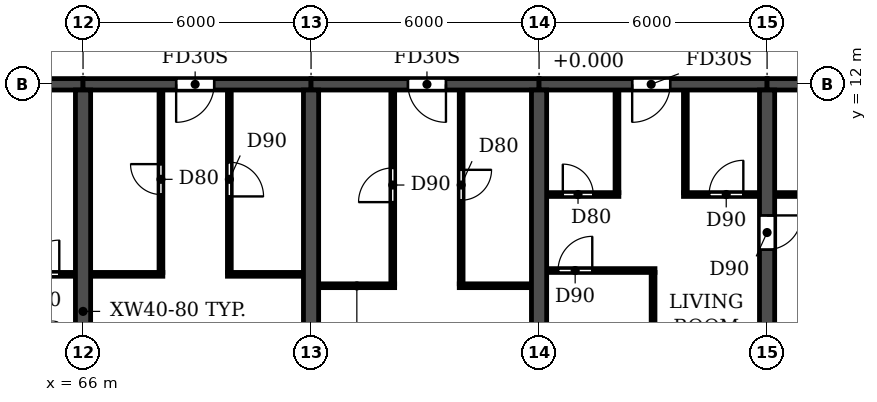
"""IFC4 building model, lengths in metres.
Left out: names, types, materials, properties, quantities, classifications, styles, units other than length and angle.
Written with IfcOpenShell. Run it as: python <this file> out.ifc"""

import sys

from ifc_helpers import new_model, si_unit, direction, frame, frame_2d, origin, place, context, subcontext, project, spatial, rectangle, extrude, element, fill, save


model = new_model("IFC4")
c1 = context("Model", 3, precision=1e-05, world=origin(), true_north=direction((0.0, 1.0)))
c2 = subcontext(c1, "Body", "Model", "MODEL_VIEW")
j1 = project(units=[si_unit("LENGTHUNIT", "METRE"), si_unit("PLANEANGLEUNIT", "RADIAN")], contexts=[c1])
p1 = place(None, origin())
s1 = spatial("IfcSite", under=j1, at=p1, CompositionType="ELEMENT")
p2 = place(p1, origin())
s2 = spatial("IfcBuilding", under=s1, at=p2, CompositionType="ELEMENT")
p3 = place(p2, frame((0.0, 0.0, 26.7)))
s3 = spatial("IfcBuildingStorey", under=s2, at=p3, CompositionType="ELEMENT", Elevation=26.7)
for number, where, z_axis, x_axis in (
    (1, (66.0, 0.2, 0.0), (0.0, 0.0, 1.0), (0.0, 1.0, 0.0)),
    (2, (72.0, 0.2, 0.0), (0.0, 0.0, 1.0), (0.0, 1.0, 0.0)),
    (3, (78.0, 0.2, 0.0), (0.0, 0.0, 1.0), (0.0, 1.0, 0.0)),
):
    element("IfcWall", number, at=place(p3, frame(where, z_axis=z_axis, x_axis=x_axis)), inside=s3, PredefinedType="SHEAR", context=c2, shape_type="SweptSolid", body=[
        extrude(rectangle(XDim=11.65, YDim=0.4, at=frame_2d((5.825, 0.0))), origin(), (0.0, 0.0, 1.0), 3.05),
    ])
p4 = place(p3, frame((84.0, 0.2, 0.0), z_axis=(0.0, 0.0, 1.0), x_axis=(0.0, 1.0, 0.0)))
e4 = element("IfcWall", 4, at=p4, inside=s3, PredefinedType="SHEAR", context=c2, shape_type="SweptSolid", body=[
    extrude(rectangle(XDim=11.65, YDim=0.4, at=frame_2d((5.825, 0.0))), origin(), (0.0, 0.0, 1.0), 3.05),
])
p5 = place(p4, frame((7.45, 0.0, 0.0)))
e5 = element("IfcOpeningElement", 5, at=p5, cuts=e4, PredefinedType="OPENING", context=c2, shape_type="SweptSolid", body=[
    extrude(rectangle(XDim=0.9, YDim=2.1, at=frame_2d((0.45, 1.05))), frame((0.0, 0.21, 0.0), z_axis=(0.0, -1.0, 0.0), x_axis=(1.0, 0.0, 0.0)), (0.0, 0.0, 1.0), 0.42),
])
p6 = place(p3, frame((60.0, 12.0, 0.0), z_axis=(0.0, 0.0, 1.0), x_axis=(1.0, 0.0, 0.0)))
e6 = element("IfcWall", 6, at=p6, inside=s3, PredefinedType="SHEAR", context=c2, shape_type="SweptSolid", body=[
    extrude(rectangle(XDim=6.0, YDim=0.3, at=frame_2d((3.0, 0.0))), origin(), (0.0, 0.0, 1.0), 2.45),
])
p7 = place(p6, frame((2.45, 0.0, 0.0)))
e7 = element("IfcOpeningElement", 7, at=p7, cuts=e6, PredefinedType="OPENING", context=c2, shape_type="SweptSolid", body=[
    extrude(rectangle(XDim=1.0, YDim=2.1, at=frame_2d((0.5, 1.05))), frame((0.0, 0.16, 0.0), z_axis=(0.0, -1.0, 0.0), x_axis=(1.0, 0.0, 0.0)), (0.0, 0.0, 1.0), 0.32),
])
p8 = place(p3, frame((66.0, 12.0, 0.0), z_axis=(0.0, 0.0, 1.0), x_axis=(1.0, 0.0, 0.0)))
e8 = element("IfcWall", 8, at=p8, inside=s3, PredefinedType="SHEAR", context=c2, shape_type="SweptSolid", body=[
    extrude(rectangle(XDim=6.0, YDim=0.3, at=frame_2d((3.0, 0.0))), origin(), (0.0, 0.0, 1.0), 2.45),
])
p9 = place(p8, frame((2.45, 0.0, 0.0)))
e9 = element("IfcOpeningElement", 9, at=p9, cuts=e8, PredefinedType="OPENING", context=c2, shape_type="SweptSolid", body=[
    extrude(rectangle(XDim=1.0, YDim=2.1, at=frame_2d((0.5, 1.05))), frame((0.0, 0.16, 0.0), z_axis=(0.0, -1.0, 0.0), x_axis=(1.0, 0.0, 0.0)), (0.0, 0.0, 1.0), 0.32),
])
p10 = place(p3, frame((72.0, 12.0, 0.0), z_axis=(0.0, 0.0, 1.0), x_axis=(1.0, 0.0, 0.0)))
e10 = element("IfcWall", 10, at=p10, inside=s3, PredefinedType="SHEAR", context=c2, shape_type="SweptSolid", body=[
    extrude(rectangle(XDim=6.0, YDim=0.3, at=frame_2d((3.0, 0.0))), origin(), (0.0, 0.0, 1.0), 2.45),
])
p11 = place(p10, frame((2.55, 0.0, 0.0)))
e11 = element("IfcOpeningElement", 11, at=p11, cuts=e10, PredefinedType="OPENING", context=c2, shape_type="SweptSolid", body=[
    extrude(rectangle(XDim=1.0, YDim=2.1, at=frame_2d((0.5, 1.05))), frame((0.0, 0.16, 0.0), z_axis=(0.0, -1.0, 0.0), x_axis=(1.0, 0.0, 0.0)), (0.0, 0.0, 1.0), 0.32),
])
p12 = place(p3, frame((78.0, 12.0, 0.0), z_axis=(0.0, 0.0, 1.0), x_axis=(1.0, 0.0, 0.0)))
e12 = element("IfcWall", 12, at=p12, inside=s3, PredefinedType="SHEAR", context=c2, shape_type="SweptSolid", body=[
    extrude(rectangle(XDim=6.0, YDim=0.3, at=frame_2d((3.0, 0.0))), origin(), (0.0, 0.0, 1.0), 2.45),
])
p13 = place(p12, frame((2.45, 0.0, 0.0)))
e13 = element("IfcOpeningElement", 13, at=p13, cuts=e12, PredefinedType="OPENING", context=c2, shape_type="SweptSolid", body=[
    extrude(rectangle(XDim=1.0, YDim=2.1, at=frame_2d((0.5, 1.05))), frame((0.0, 0.16, 0.0), z_axis=(0.0, -1.0, 0.0), x_axis=(1.0, 0.0, 0.0)), (0.0, 0.0, 1.0), 0.32),
])
p14 = place(p3, frame((84.0, 12.0, 0.0), z_axis=(0.0, 0.0, 1.0), x_axis=(1.0, 0.0, 0.0)))
e14 = element("IfcWall", 14, at=p14, inside=s3, PredefinedType="SHEAR", context=c2, shape_type="SweptSolid", body=[
    extrude(rectangle(XDim=6.0, YDim=0.3, at=frame_2d((3.0, 0.0))), origin(), (0.0, 0.0, 1.0), 2.45),
])
p15 = place(p3, frame((72.21, 6.7, 0.0), z_axis=(0.0, 0.0, 1.0), x_axis=(1.0, 0.0, 0.0)))
e15 = element("IfcWall", 15, at=p15, inside=s3, PredefinedType="PARTITIONING", context=c2, shape_type="SweptSolid", body=[
    extrude(rectangle(XDim=1.99, YDim=0.1, at=frame_2d((0.995, 0.0))), origin(), (0.0, 0.0, 1.0), 3.05),
])
p16 = place(p3, frame((75.9, 6.7, 0.0), z_axis=(0.0, 0.0, 1.0), x_axis=(1.0, 0.0, 0.0)))
e16 = element("IfcWall", 16, at=p16, inside=s3, PredefinedType="PARTITIONING", context=c2, shape_type="SweptSolid", body=[
    extrude(rectangle(XDim=1.89, YDim=0.1, at=frame_2d((0.945, 0.0))), origin(), (0.0, 0.0, 1.0), 3.05),
])
p17 = place(p3, frame((63.8, 7.0, 0.0), z_axis=(0.0, 0.0, 1.0), x_axis=(1.0, 0.0, 0.0)))
e17 = element("IfcWall", 17, at=p17, inside=s3, PredefinedType="PARTITIONING", context=c2, shape_type="SweptSolid", body=[
    extrude(rectangle(XDim=1.99, YDim=0.1, at=frame_2d((0.995, 0.0))), origin(), (0.0, 0.0, 1.0), 3.05),
])
p18 = place(p17, frame((0.675, 0.0, 0.0)))
e18 = element("IfcOpeningElement", 18, at=p18, cuts=e17, PredefinedType="OPENING", context=c2, shape_type="SweptSolid", body=[
    extrude(rectangle(XDim=0.9, YDim=2.1, at=frame_2d((0.45, 1.05))), frame((0.0, 0.06, 0.0), z_axis=(0.0, -1.0, 0.0), x_axis=(1.0, 0.0, 0.0)), (0.0, 0.0, 1.0), 0.12),
])
p19 = place(p3, frame((66.21, 7.0, 0.0), z_axis=(0.0, 0.0, 1.0), x_axis=(1.0, 0.0, 0.0)))
e19 = element("IfcWall", 19, at=p19, inside=s3, PredefinedType="PARTITIONING", context=c2, shape_type="SweptSolid", body=[
    extrude(rectangle(XDim=1.89, YDim=0.1, at=frame_2d((0.945, 0.0))), origin(), (0.0, 0.0, 1.0), 3.05),
])
p20 = place(p3, frame((69.8, 7.0, 0.0), z_axis=(0.0, 0.0, 1.0), x_axis=(1.0, 0.0, 0.0)))
e20 = element("IfcWall", 20, at=p20, inside=s3, PredefinedType="PARTITIONING", context=c2, shape_type="SweptSolid", body=[
    extrude(rectangle(XDim=1.99, YDim=0.1, at=frame_2d((0.995, 0.0))), origin(), (0.0, 0.0, 1.0), 3.05),
])
p21 = place(p3, frame((78.21, 7.1, 0.0), z_axis=(0.0, 0.0, 1.0), x_axis=(1.0, 0.0, 0.0)))
e21 = element("IfcWall", 21, at=p21, inside=s3, PredefinedType="PARTITIONING", context=c2, shape_type="SweptSolid", body=[
    extrude(rectangle(XDim=2.84, YDim=0.1, at=frame_2d((1.42, 0.0))), origin(), (0.0, 0.0, 1.0), 3.05),
])
p22 = place(p21, frame((0.29, 0.0, 0.0)))
e22 = element("IfcOpeningElement", 22, at=p22, cuts=e21, PredefinedType="OPENING", context=c2, shape_type="SweptSolid", body=[
    extrude(rectangle(XDim=0.9, YDim=2.1, at=frame_2d((0.45, 1.05))), frame((0.0, 0.06, 0.0), z_axis=(0.0, -1.0, 0.0), x_axis=(1.0, 0.0, 0.0)), (0.0, 0.0, 1.0), 0.12),
])
p23 = place(p3, frame((78.21, 9.1, 0.0), z_axis=(0.0, 0.0, 1.0), x_axis=(1.0, 0.0, 0.0)))
e23 = element("IfcWall", 23, at=p23, inside=s3, PredefinedType="PARTITIONING", context=c2, shape_type="SweptSolid", body=[
    extrude(rectangle(XDim=1.89, YDim=0.1, at=frame_2d((0.945, 0.0))), origin(), (0.0, 0.0, 1.0), 3.05),
])
p24 = place(p23, frame((0.415, 0.0, 0.0)))
e24 = element("IfcOpeningElement", 24, at=p24, cuts=e23, PredefinedType="OPENING", context=c2, shape_type="SweptSolid", body=[
    extrude(rectangle(XDim=0.8, YDim=2.1, at=frame_2d((0.4, 1.05))), frame((0.0, 0.06, 0.0), z_axis=(0.0, -1.0, 0.0), x_axis=(1.0, 0.0, 0.0)), (0.0, 0.0, 1.0), 0.12),
])
p25 = place(p3, frame((81.8, 9.1, 0.0), z_axis=(0.0, 0.0, 1.0), x_axis=(1.0, 0.0, 0.0)))
e25 = element("IfcWall", 25, at=p25, inside=s3, PredefinedType="PARTITIONING", context=c2, shape_type="SweptSolid", body=[
    extrude(rectangle(XDim=1.99, YDim=0.1, at=frame_2d((0.995, 0.0))), origin(), (0.0, 0.0, 1.0), 3.05),
])
p26 = place(p25, frame((0.675, 0.0, 0.0)))
e26 = element("IfcOpeningElement", 26, at=p26, cuts=e25, PredefinedType="OPENING", context=c2, shape_type="SweptSolid", body=[
    extrude(rectangle(XDim=0.9, YDim=2.1, at=frame_2d((0.45, 1.05))), frame((0.0, 0.06, 0.0), z_axis=(0.0, -1.0, 0.0), x_axis=(1.0, 0.0, 0.0)), (0.0, 0.0, 1.0), 0.12),
])
p27 = place(p3, frame((84.21, 9.1, 0.0), z_axis=(0.0, 0.0, 1.0), x_axis=(1.0, 0.0, 0.0)))
e27 = element("IfcWall", 27, at=p27, inside=s3, PredefinedType="PARTITIONING", context=c2, shape_type="SweptSolid", body=[
    extrude(rectangle(XDim=2.69, YDim=0.1, at=frame_2d((1.345, 0.0))), origin(), (0.0, 0.0, 1.0), 3.05),
])
p28 = place(p27, frame((0.89, 0.0, 0.0)))
e28 = element("IfcOpeningElement", 28, at=p28, cuts=e27, PredefinedType="OPENING", context=c2, shape_type="SweptSolid", body=[
    extrude(rectangle(XDim=0.8, YDim=2.1, at=frame_2d((0.4, 1.05))), frame((0.0, 0.06, 0.0), z_axis=(0.0, -1.0, 0.0), x_axis=(1.0, 0.0, 0.0)), (0.0, 0.0, 1.0), 0.12),
])
p29 = place(p3, frame((68.05, 7.05, 0.0), z_axis=(0.0, 0.0, 1.0), x_axis=(0.0, 1.0, 0.0)))
e29 = element("IfcWall", 29, at=p29, inside=s3, PredefinedType="PARTITIONING", context=c2, shape_type="SweptSolid", body=[
    extrude(rectangle(XDim=4.79, YDim=0.1, at=frame_2d((2.395, 0.0))), origin(), (0.0, 0.0, 1.0), 3.05),
])
p30 = place(p29, frame((2.05, 0.0, 0.0)))
e30 = element("IfcOpeningElement", 30, at=p30, cuts=e29, PredefinedType="OPENING", context=c2, shape_type="SweptSolid", body=[
    extrude(rectangle(XDim=0.8, YDim=2.1, at=frame_2d((0.4, 1.05))), frame((0.0, 0.06, 0.0), z_axis=(0.0, -1.0, 0.0), x_axis=(1.0, 0.0, 0.0)), (0.0, 0.0, 1.0), 0.12),
])
p31 = place(p3, frame((69.85, 7.05, 0.0), z_axis=(0.0, 0.0, 1.0), x_axis=(0.0, 1.0, 0.0)))
e31 = element("IfcWall", 31, at=p31, inside=s3, PredefinedType="PARTITIONING", context=c2, shape_type="SweptSolid", body=[
    extrude(rectangle(XDim=4.79, YDim=0.1, at=frame_2d((2.395, 0.0))), origin(), (0.0, 0.0, 1.0), 3.05),
])
p32 = place(p31, frame((2.0, 0.0, 0.0)))
e32 = element("IfcOpeningElement", 32, at=p32, cuts=e31, PredefinedType="OPENING", context=c2, shape_type="SweptSolid", body=[
    extrude(rectangle(XDim=0.9, YDim=2.1, at=frame_2d((0.45, 1.05))), frame((0.0, 0.06, 0.0), z_axis=(0.0, -1.0, 0.0), x_axis=(1.0, 0.0, 0.0)), (0.0, 0.0, 1.0), 0.12),
])
p33 = place(p3, frame((74.15, 6.75, 0.0), z_axis=(0.0, 0.0, 1.0), x_axis=(0.0, 1.0, 0.0)))
e33 = element("IfcWall", 33, at=p33, inside=s3, PredefinedType="PARTITIONING", context=c2, shape_type="SweptSolid", body=[
    extrude(rectangle(XDim=5.09, YDim=0.1, at=frame_2d((2.545, 0.0))), origin(), (0.0, 0.0, 1.0), 3.05),
])
p34 = place(p33, frame((2.15, 0.0, 0.0)))
e34 = element("IfcOpeningElement", 34, at=p34, cuts=e33, PredefinedType="OPENING", context=c2, shape_type="SweptSolid", body=[
    extrude(rectangle(XDim=0.9, YDim=2.1, at=frame_2d((0.45, 1.05))), frame((0.0, 0.06, 0.0), z_axis=(0.0, -1.0, 0.0), x_axis=(1.0, 0.0, 0.0)), (0.0, 0.0, 1.0), 0.12),
])
p35 = place(p3, frame((75.95, 6.75, 0.0), z_axis=(0.0, 0.0, 1.0), x_axis=(0.0, 1.0, 0.0)))
e35 = element("IfcWall", 35, at=p35, inside=s3, PredefinedType="PARTITIONING", context=c2, shape_type="SweptSolid", body=[
    extrude(rectangle(XDim=5.09, YDim=0.1, at=frame_2d((2.545, 0.0))), origin(), (0.0, 0.0, 1.0), 3.05),
])
p36 = place(p35, frame((2.2, 0.0, 0.0)))
e36 = element("IfcOpeningElement", 36, at=p36, cuts=e35, PredefinedType="OPENING", context=c2, shape_type="SweptSolid", body=[
    extrude(rectangle(XDim=0.8, YDim=2.1, at=frame_2d((0.4, 1.05))), frame((0.0, 0.06, 0.0), z_axis=(0.0, -1.0, 0.0), x_axis=(1.0, 0.0, 0.0)), (0.0, 0.0, 1.0), 0.12),
])
p37 = place(p3, frame((80.05, 9.15, 0.0), z_axis=(0.0, 0.0, 1.0), x_axis=(0.0, 1.0, 0.0)))
e37 = element("IfcWall", 37, at=p37, inside=s3, PredefinedType="PARTITIONING", context=c2, shape_type="SweptSolid", body=[
    extrude(rectangle(XDim=2.69, YDim=0.1, at=frame_2d((1.345, 0.0))), origin(), (0.0, 0.0, 1.0), 3.05),
])
p38 = place(p3, frame((81.0, 0.06, 0.0), z_axis=(0.0, 0.0, 1.0), x_axis=(0.0, 1.0, 0.0)))
e38 = element("IfcWall", 38, at=p38, inside=s3, PredefinedType="PARTITIONING", context=c2, shape_type="SweptSolid", body=[
    extrude(rectangle(XDim=6.99, YDim=0.1, at=frame_2d((3.495, 0.0))), origin(), (0.0, 0.0, 1.0), 3.05),
])
p39 = place(p3, frame((81.85, 9.15, 0.0), z_axis=(0.0, 0.0, 1.0), x_axis=(0.0, 1.0, 0.0)))
e39 = element("IfcWall", 39, at=p39, inside=s3, PredefinedType="PARTITIONING", context=c2, shape_type="SweptSolid", body=[
    extrude(rectangle(XDim=2.69, YDim=0.1, at=frame_2d((1.345, 0.0))), origin(), (0.0, 0.0, 1.0), 3.05),
])
p40 = place(p18, origin())
e40 = element("IfcDoor", 40, at=p40, inside=s3, OperationType="SINGLE_SWING_RIGHT", PredefinedType="DOOR", context=c2, shape_type="SweptSolid", body=[
    extrude(rectangle(XDim=0.9, YDim=2.1, at=frame_2d((0.45, 1.05))), frame((0.0, 0.025, 0.0), z_axis=(0.0, -1.0, 0.0), x_axis=(1.0, 0.0, 0.0)), (0.0, 0.0, 1.0), 0.05),
])
fill(e18, e40)
p41 = place(p30, origin())
e41 = element("IfcDoor", 41, at=p41, inside=s3, OperationType="SINGLE_SWING_RIGHT", PredefinedType="DOOR", context=c2, shape_type="SweptSolid", body=[
    extrude(rectangle(XDim=0.8, YDim=2.1, at=frame_2d((0.4, 1.05))), frame((0.0, 0.025, 0.0), z_axis=(0.0, -1.0, 0.0), x_axis=(1.0, 0.0, 0.0)), (0.0, 0.0, 1.0), 0.05),
])
fill(e30, e41)
p42 = place(p9, frame((1.0, 0.0, 0.0), z_axis=(0.0, 0.0, 1.0), x_axis=(-1.0, 0.0, 0.0)))
e42 = element("IfcDoor", 42, at=p42, inside=s3, OperationType="SINGLE_SWING_RIGHT", PredefinedType="DOOR", context=c2, shape_type="SweptSolid", body=[
    extrude(rectangle(XDim=1.0, YDim=2.1, at=frame_2d((0.5, 1.05))), frame((0.0, 0.025, 0.0), z_axis=(0.0, -1.0, 0.0), x_axis=(1.0, 0.0, 0.0)), (0.0, 0.0, 1.0), 0.05),
])
fill(e9, e42)
p43 = place(p32, frame((0.9, 0.0, 0.0), z_axis=(0.0, 0.0, 1.0), x_axis=(-1.0, 0.0, 0.0)))
e43 = element("IfcDoor", 43, at=p43, inside=s3, OperationType="SINGLE_SWING_RIGHT", PredefinedType="DOOR", context=c2, shape_type="SweptSolid", body=[
    extrude(rectangle(XDim=0.9, YDim=2.1, at=frame_2d((0.45, 1.05))), frame((0.0, 0.025, 0.0), z_axis=(0.0, -1.0, 0.0), x_axis=(1.0, 0.0, 0.0)), (0.0, 0.0, 1.0), 0.05),
])
fill(e32, e43)
p44 = place(p34, origin())
e44 = element("IfcDoor", 44, at=p44, inside=s3, OperationType="SINGLE_SWING_LEFT", PredefinedType="DOOR", context=c2, shape_type="SweptSolid", body=[
    extrude(rectangle(XDim=0.9, YDim=2.1, at=frame_2d((0.45, 1.05))), frame((0.0, 0.025, 0.0), z_axis=(0.0, -1.0, 0.0), x_axis=(1.0, 0.0, 0.0)), (0.0, 0.0, 1.0), 0.05),
])
fill(e34, e44)
p45 = place(p11, frame((1.0, 0.0, 0.0), z_axis=(0.0, 0.0, 1.0), x_axis=(-1.0, 0.0, 0.0)))
e45 = element("IfcDoor", 45, at=p45, inside=s3, OperationType="SINGLE_SWING_LEFT", PredefinedType="DOOR", context=c2, shape_type="SweptSolid", body=[
    extrude(rectangle(XDim=1.0, YDim=2.1, at=frame_2d((0.5, 1.05))), frame((0.0, 0.025, 0.0), z_axis=(0.0, -1.0, 0.0), x_axis=(1.0, 0.0, 0.0)), (0.0, 0.0, 1.0), 0.05),
])
fill(e11, e45)
p46 = place(p36, frame((0.8, 0.0, 0.0), z_axis=(0.0, 0.0, 1.0), x_axis=(-1.0, 0.0, 0.0)))
e46 = element("IfcDoor", 46, at=p46, inside=s3, OperationType="SINGLE_SWING_LEFT", PredefinedType="DOOR", context=c2, shape_type="SweptSolid", body=[
    extrude(rectangle(XDim=0.8, YDim=2.1, at=frame_2d((0.4, 1.05))), frame((0.0, 0.025, 0.0), z_axis=(0.0, -1.0, 0.0), x_axis=(1.0, 0.0, 0.0)), (0.0, 0.0, 1.0), 0.05),
])
fill(e36, e46)
p47 = place(p22, origin())
e47 = element("IfcDoor", 47, at=p47, inside=s3, OperationType="SINGLE_SWING_RIGHT", PredefinedType="DOOR", context=c2, shape_type="SweptSolid", body=[
    extrude(rectangle(XDim=0.9, YDim=2.1, at=frame_2d((0.45, 1.05))), frame((0.0, 0.025, 0.0), z_axis=(0.0, -1.0, 0.0), x_axis=(1.0, 0.0, 0.0)), (0.0, 0.0, 1.0), 0.05),
])
fill(e22, e47)
p48 = place(p24, origin())
e48 = element("IfcDoor", 48, at=p48, inside=s3, OperationType="SINGLE_SWING_LEFT", PredefinedType="DOOR", context=c2, shape_type="SweptSolid", body=[
    extrude(rectangle(XDim=0.8, YDim=2.1, at=frame_2d((0.4, 1.05))), frame((0.0, 0.025, 0.0), z_axis=(0.0, -1.0, 0.0), x_axis=(1.0, 0.0, 0.0)), (0.0, 0.0, 1.0), 0.05),
])
fill(e24, e48)
p49 = place(p13, frame((1.0, 0.0, 0.0), z_axis=(0.0, 0.0, 1.0), x_axis=(-1.0, 0.0, 0.0)))
e49 = element("IfcDoor", 49, at=p49, inside=s3, OperationType="SINGLE_SWING_RIGHT", PredefinedType="DOOR", context=c2, shape_type="SweptSolid", body=[
    extrude(rectangle(XDim=1.0, YDim=2.1, at=frame_2d((0.5, 1.05))), frame((0.0, 0.025, 0.0), z_axis=(0.0, -1.0, 0.0), x_axis=(1.0, 0.0, 0.0)), (0.0, 0.0, 1.0), 0.05),
])
fill(e13, e49)
p50 = place(p26, origin())
e50 = element("IfcDoor", 50, at=p50, inside=s3, OperationType="SINGLE_SWING_RIGHT", PredefinedType="DOOR", context=c2, shape_type="SweptSolid", body=[
    extrude(rectangle(XDim=0.9, YDim=2.1, at=frame_2d((0.45, 1.05))), frame((0.0, 0.025, 0.0), z_axis=(0.0, -1.0, 0.0), x_axis=(1.0, 0.0, 0.0)), (0.0, 0.0, 1.0), 0.05),
])
fill(e26, e50)
p51 = place(p5, frame((0.9, 0.0, 0.0), z_axis=(0.0, 0.0, 1.0), x_axis=(-1.0, 0.0, 0.0)))
e51 = element("IfcDoor", 51, at=p51, inside=s3, OperationType="SINGLE_SWING_LEFT", PredefinedType="DOOR", context=c2, shape_type="SweptSolid", body=[
    extrude(rectangle(XDim=0.9, YDim=2.1, at=frame_2d((0.45, 1.05))), frame((0.0, 0.025, 0.0), z_axis=(0.0, -1.0, 0.0), x_axis=(1.0, 0.0, 0.0)), (0.0, 0.0, 1.0), 0.05),
])
fill(e5, e51)
save(model, sys.argv[1])
